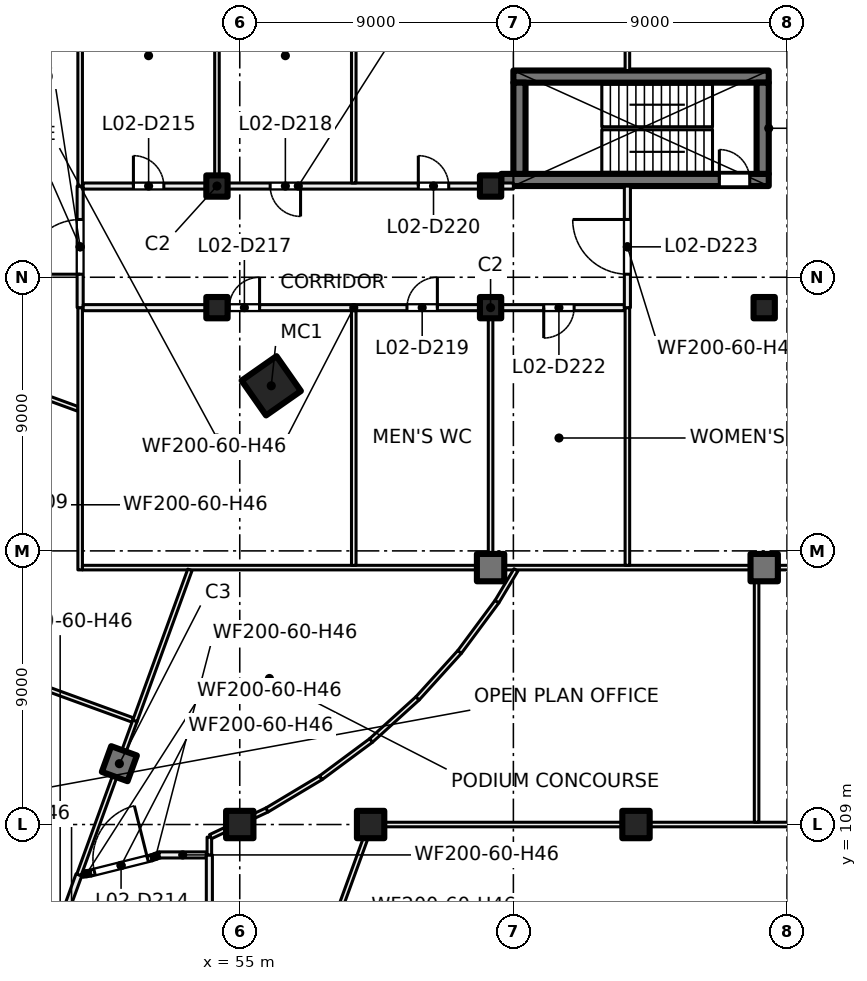
"""IFC4 building model, lengths in metres.
Left out: names, types, materials, properties, quantities, classifications, styles, units other than length and angle.
Written with IfcOpenShell. Run it as: python <this file> out.ifc"""

import sys

from ifc_helpers import new_model, si_unit, direction, frame, frame_2d, origin, origin_2d, place, context, subcontext, project, spatial, rectangle, hollow_rectangle, extrude, element, fill, save


model = new_model("IFC4")
c1 = context("Model", 3, precision=1e-05, world=origin(), true_north=direction((0.0, 1.0)))
c2 = subcontext(c1, "Body", "Model", "MODEL_VIEW")
j1 = project(units=[si_unit("LENGTHUNIT", "METRE"), si_unit("PLANEANGLEUNIT", "RADIAN")], contexts=[c1])
p1 = place(None, origin())
s1 = spatial("IfcSite", under=j1, at=p1, CompositionType="ELEMENT")
p2 = place(p1, origin())
s2 = spatial("IfcBuilding", under=s1, at=p2, CompositionType="ELEMENT")
p3 = place(p2, frame((0.0, 0.0, 12.5)))
s3 = spatial("IfcBuildingStorey", under=s2, at=p3, CompositionType="ELEMENT", Elevation=12.5)
for number, where, z_axis, x_axis in (
    (1, (55.0, 109.0, 0.0), (0.0, 0.0, 1.0), (1.0, 0.0, 0.0)),
    (2, (59.304, 109.0, 0.0), (0.0, 0.0, 1.0), (1.0, 0.0, 0.0)),
    (3, (68.033, 109.0, 0.0), (0.0, 0.0, 1.0), (1.0, 0.0, 0.0)),
):
    element("IfcColumn", number, at=place(p3, frame(where, z_axis=z_axis, x_axis=x_axis)), inside=s3, PredefinedType="COLUMN", context=c2, shape_type="SweptSolid", body=[
        extrude(rectangle(XDim=0.9, YDim=0.9, at=origin_2d()), origin(), (0.0, 0.0, 1.0), 5.0),
    ])
p4 = place(p3, frame((56.036, 123.43, 0.0), z_axis=(0.0, 0.0, 1.0), x_axis=(0.573576436351, -0.819152044289, 0.0)))
e4 = element("IfcColumn", 4, at=p4, inside=s3, PredefinedType="COLUMN", context=c2, shape_type="SweptSolid", body=[
    extrude(hollow_rectangle(XDim=1.4, YDim=1.4, WallThickness=0.04, at=origin_2d()), origin(), (0.0, 0.0, 1.0), 5.0),
])
for number, where, z_axis, x_axis in (
    (5, (54.25, 130.0, 0.0), (0.0, 0.0, 1.0), (1.0, 0.0, 0.0)),
    (6, (63.25, 130.0, 0.0), (0.0, 0.0, 1.0), (1.0, 0.0, 0.0)),
    (7, (54.25, 126.0, 0.0), (0.0, 0.0, 1.0), (1.0, 0.0, 0.0)),
    (8, (63.25, 126.0, 0.0), (0.0, 0.0, 1.0), (1.0, 0.0, 0.0)),
    (9, (72.25, 126.0, 0.0), (0.0, 0.0, 1.0), (1.0, 0.0, 0.0)),
):
    element("IfcColumn", number, at=place(p3, frame(where, z_axis=z_axis, x_axis=x_axis)), inside=s3, PredefinedType="COLUMN", context=c2, shape_type="SweptSolid", body=[
        extrude(rectangle(XDim=0.7, YDim=0.7, at=origin_2d()), origin(), (0.0, 0.0, 1.0), 5.0),
    ])
for number, where, z_axis, x_axis in (
    (10, (63.25, 117.45, 0.0), (0.0, 0.0, 1.0), (1.0, 0.0, 0.0)),
    (11, (72.25, 117.45, 0.0), (0.0, 0.0, 1.0), (1.0, 0.0, 0.0)),
    (12, (51.04, 111.001, 0.0), (0.0, 0.0, 1.0), (-0.342, -0.94, 0.0)),
):
    element("IfcColumn", number, at=place(p3, frame(where, z_axis=z_axis, x_axis=x_axis)), inside=s3, PredefinedType="COLUMN", context=c2, shape_type="SweptSolid", body=[
        extrude(rectangle(XDim=0.9, YDim=0.9, at=origin_2d()), origin(), (0.0, 0.0, 1.0), 5.0),
    ])
p5 = place(p3, frame((63.6, 130.2, 0.0), z_axis=(0.0, 0.0, 1.0), x_axis=(1.0, 0.0, 0.0)))
e13 = element("IfcWall", 13, at=p5, inside=s3, PredefinedType="SHEAR", context=c2, shape_type="SweptSolid", body=[
    extrude(rectangle(XDim=8.8, YDim=0.4, at=frame_2d((4.4, 0.0))), origin(), (0.0, 0.0, 1.0), 5.0),
])
p6 = place(p5, frame((7.175, 0.0, 0.0)))
e14 = element("IfcOpeningElement", 14, at=p6, cuts=e13, PredefinedType="OPENING", context=c2, shape_type="SweptSolid", body=[
    extrude(rectangle(XDim=1.0, YDim=2.1, at=frame_2d((0.5, 1.05))), frame((0.0, 0.21, 0.0), z_axis=(0.0, -1.0, 0.0), x_axis=(1.0, 0.0, 0.0)), (0.0, 0.0, 1.0), 0.42),
])
p7 = place(p3, frame((64.0, 133.6, 0.0), z_axis=(0.0, 0.0, 1.0), x_axis=(1.0, 0.0, 0.0)))
e15 = element("IfcWall", 15, at=p7, inside=s3, PredefinedType="SHEAR", context=c2, shape_type="SweptSolid", body=[
    extrude(rectangle(XDim=8.4, YDim=0.4, at=frame_2d((4.2, 0.0))), origin(), (0.0, 0.0, 1.0), 5.0),
])
for number, where, z_axis, x_axis in (
    (16, (64.2, 130.4, 0.0), (0.0, 0.0, 1.0), (0.0, 1.0, 0.0)),
    (17, (72.2, 130.4, 0.0), (0.0, 0.0, 1.0), (0.0, 1.0, 0.0)),
):
    element("IfcWall", number, at=place(p3, frame(where, z_axis=z_axis, x_axis=x_axis)), inside=s3, PredefinedType="SHEAR", context=c2, shape_type="SweptSolid", body=[
        extrude(rectangle(XDim=3.0, YDim=0.4, at=frame_2d((1.5, 0.0))), origin(), (0.0, 0.0, 1.0), 5.0),
    ])
p8 = place(p3, frame((43.613, 115.301, 0.0), z_axis=(0.0, 0.0, 1.0), x_axis=(0.93970742794, -0.341979458265, 0.0)))
e18 = element("IfcWall", 18, at=p8, inside=s3, PredefinedType="PARTITIONING", context=c2, shape_type="SweptSolid", body=[
    extrude(rectangle(XDim=8.375, YDim=0.15, at=frame_2d((4.188, 0.0))), origin(), (0.0, 0.0, 1.0), 4.6),
])
p9 = place(p3, frame((46.597, 123.792, 0.0), z_axis=(0.0, 0.0, 1.0), x_axis=(0.939619227089, -0.342221723572, 0.0)))
e19 = element("IfcWall", 19, at=p9, inside=s3, PredefinedType="PARTITIONING", context=c2, shape_type="SweptSolid", body=[
    extrude(rectangle(XDim=3.276, YDim=0.15, at=frame_2d((1.638, 0.0))), origin(), (0.0, 0.0, 1.0), 4.6),
])
p10 = place(p3, frame((48.475, 103.953, 0.0), z_axis=(0.0, 0.0, 1.0), x_axis=(0.341992779494, 0.939702579955, 0.0)))
e20 = element("IfcWall", 20, at=p10, inside=s3, PredefinedType="PARTITIONING", context=c2, shape_type="SweptSolid", body=[
    extrude(rectangle(XDim=3.611, YDim=0.2, at=frame_2d((1.805, 0.0))), origin(), (0.0, 0.0, 1.0), 4.6),
])
p11 = place(p3, frame((49.823, 107.363, 0.0), z_axis=(0.0, 0.0, 1.0), x_axis=(0.988866439098, 0.148805798359, 0.0)))
e21 = element("IfcWall", 21, at=p11, inside=s3, PredefinedType="PARTITIONING", context=c2, shape_type="SweptSolid", body=[
    extrude(rectangle(XDim=0.282, YDim=0.2, at=frame_2d((0.141, 0.0))), origin(), (0.0, 0.0, 1.0), 4.6),
])
p12 = place(p3, frame((49.71, 107.346, 0.0), z_axis=(0.0, 0.0, 1.0), x_axis=(0.341943087223, 0.939720663336, 0.0)))
e22 = element("IfcWall", 22, at=p12, inside=s3, PredefinedType="PARTITIONING", context=c2, shape_type="SweptSolid", body=[
    extrude(rectangle(XDim=5.39, YDim=0.15, at=frame_2d((2.695, 0.0))), origin(), (0.0, 0.0, 1.0), 4.6),
])
p13 = place(p3, frame((49.75, 117.375, 0.0), z_axis=(0.0, 0.0, 1.0), x_axis=(0.0, 1.0, 0.0)))
e23 = element("IfcWall", 23, at=p13, inside=s3, PredefinedType="PARTITIONING", context=c2, shape_type="SweptSolid", body=[
    extrude(rectangle(XDim=8.625, YDim=0.15, at=frame_2d((4.312, 0.0))), origin(), (0.0, 0.0, 1.0), 4.6),
])
p14 = place(p3, frame((49.825, 117.45, 0.0), z_axis=(0.0, 0.0, 1.0), x_axis=(1.0, 0.0, 0.0)))
e24 = element("IfcWall", 24, at=p14, inside=s3, PredefinedType="PARTITIONING", context=c2, shape_type="SweptSolid", body=[
    extrude(rectangle(XDim=41.175, YDim=0.15, at=frame_2d((20.587, 0.0))), origin(), (0.0, 0.0, 1.0), 4.6),
])
p15 = place(p3, frame((49.75, 126.0, 0.0), z_axis=(0.0, 0.0, 1.0), x_axis=(0.0, 1.0, 0.0)))
e25 = element("IfcWall", 25, at=p15, inside=s3, PredefinedType="PARTITIONING", context=c2, shape_type="SweptSolid", body=[
    extrude(rectangle(XDim=4.0, YDim=0.2, at=frame_2d((2.0, 0.0))), origin(), (0.0, 0.0, 1.0), 4.6),
])
p16 = place(p15, frame((1.1, 0.0, 0.0)))
e26 = element("IfcOpeningElement", 26, at=p16, cuts=e25, PredefinedType="OPENING", context=c2, shape_type="SweptSolid", body=[
    extrude(rectangle(XDim=1.8, YDim=2.1, at=frame_2d((0.9, 1.05))), frame((0.0, 0.11, 0.0), z_axis=(0.0, -1.0, 0.0), x_axis=(1.0, 0.0, 0.0)), (0.0, 0.0, 1.0), 0.22),
])
p17 = place(p3, frame((67.65, 126.0, 0.0), z_axis=(0.0, 0.0, 1.0), x_axis=(-1.0, 0.0, 0.0)))
e27 = element("IfcWall", 27, at=p17, inside=s3, PredefinedType="PARTITIONING", context=c2, shape_type="SweptSolid", body=[
    extrude(rectangle(XDim=17.8, YDim=0.2, at=frame_2d((8.9, 0.0))), origin(), (0.0, 0.0, 1.0), 4.6),
])
p18 = place(p17, frame((11.998, 0.0, 0.0)))
e28 = element("IfcOpeningElement", 28, at=p18, cuts=e27, PredefinedType="OPENING", context=c2, shape_type="SweptSolid", body=[
    extrude(rectangle(XDim=1.0, YDim=2.1, at=frame_2d((0.5, 1.05))), frame((0.0, 0.11, 0.0), z_axis=(0.0, -1.0, 0.0), x_axis=(1.0, 0.0, 0.0)), (0.0, 0.0, 1.0), 0.22),
])
p19 = place(p17, frame((6.15, 0.0, 0.0)))
e29 = element("IfcOpeningElement", 29, at=p19, cuts=e27, PredefinedType="OPENING", context=c2, shape_type="SweptSolid", body=[
    extrude(rectangle(XDim=1.0, YDim=2.1, at=frame_2d((0.5, 1.05))), frame((0.0, 0.11, 0.0), z_axis=(0.0, -1.0, 0.0), x_axis=(1.0, 0.0, 0.0)), (0.0, 0.0, 1.0), 0.22),
])
p20 = place(p17, frame((1.652, 0.0, 0.0)))
e30 = element("IfcOpeningElement", 30, at=p20, cuts=e27, PredefinedType="OPENING", context=c2, shape_type="SweptSolid", body=[
    extrude(rectangle(XDim=1.0, YDim=2.1, at=frame_2d((0.5, 1.05))), frame((0.0, 0.11, 0.0), z_axis=(0.0, -1.0, 0.0), x_axis=(1.0, 0.0, 0.0)), (0.0, 0.0, 1.0), 0.22),
])
p21 = place(p3, frame((49.75, 130.0, 0.0), z_axis=(0.0, 0.0, 1.0), x_axis=(0.0, 1.0, 0.0)))
e31 = element("IfcWall", 31, at=p21, inside=s3, PredefinedType="PARTITIONING", context=c2, shape_type="SweptSolid", body=[
    extrude(rectangle(XDim=8.625, YDim=0.15, at=frame_2d((4.312, 0.0))), origin(), (0.0, 0.0, 1.0), 4.6),
])
p22 = place(p3, frame((49.85, 130.0, 0.0), z_axis=(0.0, 0.0, 1.0), x_axis=(1.0, 0.0, 0.0)))
e32 = element("IfcWall", 32, at=p22, inside=s3, PredefinedType="PARTITIONING", context=c2, shape_type="SweptSolid", body=[
    extrude(rectangle(XDim=14.15, YDim=0.2, at=frame_2d((7.075, 0.0))), origin(), (0.0, 0.0, 1.0), 4.6),
])
p23 = place(p22, frame((1.652, 0.0, 0.0)))
e33 = element("IfcOpeningElement", 33, at=p23, cuts=e32, PredefinedType="OPENING", context=c2, shape_type="SweptSolid", body=[
    extrude(rectangle(XDim=1.0, YDim=2.1, at=frame_2d((0.5, 1.05))), frame((0.0, 0.11, 0.0), z_axis=(0.0, -1.0, 0.0), x_axis=(1.0, 0.0, 0.0)), (0.0, 0.0, 1.0), 0.22),
])
p24 = place(p22, frame((6.15, 0.0, 0.0)))
e34 = element("IfcOpeningElement", 34, at=p24, cuts=e32, PredefinedType="OPENING", context=c2, shape_type="SweptSolid", body=[
    extrude(rectangle(XDim=1.0, YDim=2.1, at=frame_2d((0.5, 1.05))), frame((0.0, 0.11, 0.0), z_axis=(0.0, -1.0, 0.0), x_axis=(1.0, 0.0, 0.0)), (0.0, 0.0, 1.0), 0.22),
])
p25 = place(p22, frame((11.023, 0.0, 0.0)))
e35 = element("IfcOpeningElement", 35, at=p25, cuts=e32, PredefinedType="OPENING", context=c2, shape_type="SweptSolid", body=[
    extrude(rectangle(XDim=1.0, YDim=2.1, at=frame_2d((0.5, 1.05))), frame((0.0, 0.11, 0.0), z_axis=(0.0, -1.0, 0.0), x_axis=(1.0, 0.0, 0.0)), (0.0, 0.0, 1.0), 0.22),
])
p26 = place(p3, frame((52.101, 107.905, 0.0), z_axis=(0.0, 0.0, 1.0), x_axis=(-0.970177165917, -0.242396919811, 0.0)))
e36 = element("IfcWall", 36, at=p26, inside=s3, PredefinedType="PARTITIONING", context=c2, shape_type="SweptSolid", body=[
    extrude(rectangle(XDim=2.071, YDim=0.2, at=frame_2d((1.035, 0.0))), origin(), (0.0, 0.0, 1.0), 4.6),
])
p27 = place(p26, frame((0.136, 0.0, 0.0)))
e37 = element("IfcOpeningElement", 37, at=p27, cuts=e36, PredefinedType="OPENING", context=c2, shape_type="SweptSolid", body=[
    extrude(rectangle(XDim=1.8, YDim=2.1, at=frame_2d((0.9, 1.05))), frame((0.0, 0.11, 0.0), z_axis=(0.0, -1.0, 0.0), x_axis=(1.0, 0.0, 0.0)), (0.0, 0.0, 1.0), 0.22),
])
p28 = place(p3, frame((51.553, 112.411, 0.0), z_axis=(0.0, 0.0, 1.0), x_axis=(0.342076997639, 0.93967192556, 0.0)))
e38 = element("IfcWall", 38, at=p28, inside=s3, PredefinedType="PARTITIONING", context=c2, shape_type="SweptSolid", body=[
    extrude(rectangle(XDim=5.283, YDim=0.15, at=frame_2d((2.641, 0.0))), origin(), (0.0, 0.0, 1.0), 4.6),
])
p29 = place(p3, frame((52.091, 107.902, 0.0), z_axis=(0.0, 0.0, 1.0), x_axis=(0.940856992367, 0.338803954986, 0.0)))
e39 = element("IfcWall", 39, at=p29, inside=s3, PredefinedType="PARTITIONING", context=c2, shape_type="SweptSolid", body=[
    extrude(rectangle(XDim=0.307, YDim=0.2, at=frame_2d((0.153, 0.0))), origin(), (0.0, 0.0, 1.0), 4.6),
])
p30 = place(p3, frame((52.347, 108.0, 0.0), z_axis=(0.0, 0.0, 1.0), x_axis=(1.0, 0.0, 0.0)))
e40 = element("IfcWall", 40, at=p30, inside=s3, PredefinedType="PARTITIONING", context=c2, shape_type="SweptSolid", body=[
    extrude(rectangle(XDim=1.553, YDim=0.2, at=frame_2d((0.776, 0.0))), origin(), (0.0, 0.0, 1.0), 4.6),
])
p31 = place(p3, frame((54.0, 94.715, 0.0), z_axis=(0.0, 0.0, 1.0), x_axis=(0.0, 1.0, 0.0)))
e41 = element("IfcWall", 41, at=p31, inside=s3, PredefinedType="PARTITIONING", context=c2, shape_type="SweptSolid", body=[
    extrude(rectangle(XDim=13.285, YDim=0.2, at=frame_2d((6.643, 0.0))), origin(), (0.0, 0.0, 1.0), 4.6),
])
p32 = place(p3, frame((54.0, 94.429, 0.0), z_axis=(0.0, 0.0, 1.0), x_axis=(0.342085241875, 0.939668924298, 0.0)))
e42 = element("IfcWall", 42, at=p32, inside=s3, PredefinedType="PARTITIONING", context=c2, shape_type="SweptSolid", body=[
    extrude(rectangle(XDim=15.581, YDim=0.15, at=frame_2d((7.791, 0.0))), origin(), (0.0, 0.0, 1.0), 4.6),
])
p33 = place(p3, frame((54.0, 108.0, 0.0), z_axis=(0.0, 0.0, 1.0), x_axis=(0.0, 1.0, 0.0)))
e43 = element("IfcWall", 43, at=p33, inside=s3, PredefinedType="PARTITIONING", context=c2, shape_type="SweptSolid", body=[
    extrude(rectangle(XDim=0.586, YDim=0.15, at=frame_2d((0.293, 0.0))), origin(), (0.0, 0.0, 1.0), 4.6),
])
p34 = place(p3, frame((54.036, 108.599, 0.0), z_axis=(0.0, 0.0, 1.0), x_axis=(0.903959249768, 0.427618608995, 0.0)))
e44 = element("IfcWall", 44, at=p34, inside=s3, PredefinedType="PARTITIONING", context=c2, shape_type="SweptSolid", body=[
    extrude(rectangle(XDim=2.064, YDim=0.15, at=frame_2d((1.032, 0.0))), origin(), (0.0, 0.0, 1.0), 4.6),
])
p35 = place(p3, frame((54.25, 130.1, 0.0), z_axis=(0.0, 0.0, 1.0), x_axis=(0.0, 1.0, 0.0)))
e45 = element("IfcWall", 45, at=p35, inside=s3, PredefinedType="PARTITIONING", context=c2, shape_type="SweptSolid", body=[
    extrude(rectangle(XDim=8.375, YDim=0.15, at=frame_2d((4.188, 0.0))), origin(), (0.0, 0.0, 1.0), 4.6),
])
p36 = place(p3, frame((55.896, 109.478, 0.0), z_axis=(0.0, 0.0, 1.0), x_axis=(0.857784452141, 0.514009565734, 0.0)))
e46 = element("IfcWall", 46, at=p36, inside=s3, PredefinedType="PARTITIONING", context=c2, shape_type="SweptSolid", body=[
    extrude(rectangle(XDim=2.068, YDim=0.15, at=frame_2d((1.034, 0.0))), origin(), (0.0, 0.0, 1.0), 4.6),
])
p37 = place(p3, frame((57.664, 110.537, 0.0), z_axis=(0.0, 0.0, 1.0), x_axis=(0.80317638599, 0.595741297031, 0.0)))
e47 = element("IfcWall", 47, at=p37, inside=s3, PredefinedType="PARTITIONING", context=c2, shape_type="SweptSolid", body=[
    extrude(rectangle(XDim=2.068, YDim=0.15, at=frame_2d((1.034, 0.0))), origin(), (0.0, 0.0, 1.0), 4.6),
])
for number, where, z_axis, x_axis in (
    (48, (58.75, 117.525, 0.0), (0.0, 0.0, 1.0), (0.0, 1.0, 0.0)),
    (49, (58.75, 130.1, 0.0), (0.0, 0.0, 1.0), (0.0, 1.0, 0.0)),
):
    element("IfcWall", number, at=place(p3, frame(where, z_axis=z_axis, x_axis=x_axis)), inside=s3, PredefinedType="PARTITIONING", context=c2, shape_type="SweptSolid", body=[
        extrude(rectangle(XDim=8.375, YDim=0.15, at=frame_2d((4.188, 0.0))), origin(), (0.0, 0.0, 1.0), 4.6),
    ])
p38 = place(p3, frame((59.384, 109.0, 0.0), z_axis=(0.0, 0.0, 1.0), x_axis=(1.0, 0.0, 0.0)))
e50 = element("IfcWall", 50, at=p38, inside=s3, PredefinedType="PARTITIONING", context=c2, shape_type="SweptSolid", body=[
    extrude(rectangle(XDim=46.116, YDim=0.15, at=frame_2d((23.058, 0.0))), origin(), (0.0, 0.0, 1.0), 4.6),
])
p39 = place(p38, frame((21.116, 0.0, 0.0)))
e51 = element("IfcOpeningElement", 51, at=p39, cuts=e50, PredefinedType="OPENING", context=c2, shape_type="SweptSolid", body=[
    extrude(rectangle(XDim=1.0, YDim=2.1, at=frame_2d((0.5, 1.05))), frame((0.0, 0.085, 0.0), z_axis=(0.0, -1.0, 0.0), x_axis=(1.0, 0.0, 0.0)), (0.0, 0.0, 1.0), 0.17),
])
for number, where, z_axis, x_axis in (
    (52, (59.319, 111.765, 0.0), (0.0, 0.0, 1.0), (0.741, 0.671, 0.0)),
    (53, (60.847, 113.148, 0.0), (0.0, 0.0, 1.0), (0.671, 0.741, 0.0)),
):
    element("IfcWall", number, at=place(p3, frame(where, z_axis=z_axis, x_axis=x_axis)), inside=s3, PredefinedType="PARTITIONING", context=c2, shape_type="SweptSolid", body=[
        extrude(rectangle(XDim=2.068, YDim=0.15, at=frame_2d((1.034, 0.0))), origin(), (0.0, 0.0, 1.0), 4.6),
    ])
p40 = place(p3, frame((62.231, 114.675, 0.0), z_axis=(0.0, 0.0, 1.0), x_axis=(0.595741297031, 0.80317638599, 0.0)))
e54 = element("IfcWall", 54, at=p40, inside=s3, PredefinedType="PARTITIONING", context=c2, shape_type="SweptSolid", body=[
    extrude(rectangle(XDim=2.068, YDim=0.15, at=frame_2d((1.034, 0.0))), origin(), (0.0, 0.0, 1.0), 4.6),
])
p41 = place(p3, frame((63.25, 117.525, 0.0), z_axis=(0.0, 0.0, 1.0), x_axis=(0.0, 1.0, 0.0)))
e55 = element("IfcWall", 55, at=p41, inside=s3, PredefinedType="PARTITIONING", context=c2, shape_type="SweptSolid", body=[
    extrude(rectangle(XDim=8.375, YDim=0.15, at=frame_2d((4.188, 0.0))), origin(), (0.0, 0.0, 1.0), 4.6),
])
p42 = place(p3, frame((63.459, 116.33, 0.0), z_axis=(0.0, 0.0, 1.0), x_axis=(0.513906129706, 0.857846425563, 0.0)))
e56 = element("IfcWall", 56, at=p42, inside=s3, PredefinedType="PARTITIONING", context=c2, shape_type="SweptSolid", body=[
    extrude(rectangle(XDim=1.218, YDim=0.15, at=frame_2d((0.609, 0.0))), origin(), (0.0, 0.0, 1.0), 4.6),
])
p43 = place(p3, frame((67.75, 117.525, 0.0), z_axis=(0.0, 0.0, 1.0), x_axis=(0.0, 1.0, 0.0)))
e57 = element("IfcWall", 57, at=p43, inside=s3, PredefinedType="PARTITIONING", context=c2, shape_type="SweptSolid", body=[
    extrude(rectangle(XDim=8.475, YDim=0.15, at=frame_2d((4.238, 0.0))), origin(), (0.0, 0.0, 1.0), 4.6),
])
p44 = place(p3, frame((67.75, 130.0, 0.0), z_axis=(0.0, 0.0, 1.0), x_axis=(0.0, -1.0, 0.0)))
e58 = element("IfcWall", 58, at=p44, inside=s3, PredefinedType="PARTITIONING", context=c2, shape_type="SweptSolid", body=[
    extrude(rectangle(XDim=4.0, YDim=0.2, at=frame_2d((2.0, 0.0))), origin(), (0.0, 0.0, 1.0), 4.6),
])
p45 = place(p44, frame((1.1, 0.0, 0.0)))
e59 = element("IfcOpeningElement", 59, at=p45, cuts=e58, PredefinedType="OPENING", context=c2, shape_type="SweptSolid", body=[
    extrude(rectangle(XDim=1.8, YDim=2.1, at=frame_2d((0.9, 1.05))), frame((0.0, 0.11, 0.0), z_axis=(0.0, -1.0, 0.0), x_axis=(1.0, 0.0, 0.0)), (0.0, 0.0, 1.0), 0.22),
])
p46 = place(p3, frame((67.75, 133.8, 0.0), z_axis=(0.0, 0.0, 1.0), x_axis=(0.0, 1.0, 0.0)))
e60 = element("IfcWall", 60, at=p46, inside=s3, PredefinedType="PARTITIONING", context=c2, shape_type="SweptSolid", body=[
    extrude(rectangle(XDim=4.675, YDim=0.15, at=frame_2d((2.337, 0.0))), origin(), (0.0, 0.0, 1.0), 4.6),
])
p47 = place(p3, frame((72.0, 109.075, 0.0), z_axis=(0.0, 0.0, 1.0), x_axis=(0.0, 1.0, 0.0)))
e61 = element("IfcWall", 61, at=p47, inside=s3, PredefinedType="PARTITIONING", context=c2, shape_type="SweptSolid", body=[
    extrude(rectangle(XDim=8.3, YDim=0.15, at=frame_2d((4.15, 0.0))), origin(), (0.0, 0.0, 1.0), 4.6),
])
p48 = place(p6, origin())
e62 = element("IfcDoor", 62, at=p48, inside=s3, OperationType="SINGLE_SWING_LEFT", PredefinedType="DOOR", context=c2, shape_type="SweptSolid", body=[
    extrude(rectangle(XDim=1.0, YDim=2.1, at=frame_2d((0.5, 1.05))), frame((0.0, 0.025, 0.0), z_axis=(0.0, -1.0, 0.0), x_axis=(1.0, 0.0, 0.0)), (0.0, 0.0, 1.0), 0.05),
])
fill(e14, e62)
p49 = place(p16, origin())
e63 = element("IfcDoor", 63, at=p49, inside=s3, OperationType="DOUBLE_DOOR_SINGLE_SWING", PredefinedType="DOOR", context=c2, shape_type="SweptSolid", body=[
    extrude(rectangle(XDim=1.8, YDim=2.1, at=frame_2d((0.9, 1.05))), frame((0.0, 0.025, 0.0), z_axis=(0.0, -1.0, 0.0), x_axis=(1.0, 0.0, 0.0)), (0.0, 0.0, 1.0), 0.05),
])
fill(e26, e63)
p50 = place(p27, origin())
e64 = element("IfcDoor", 64, at=p50, inside=s3, OperationType="DOUBLE_DOOR_SINGLE_SWING", PredefinedType="DOOR", context=c2, shape_type="SweptSolid", body=[
    extrude(rectangle(XDim=1.8, YDim=2.1, at=frame_2d((0.9, 1.05))), frame((0.0, 0.025, 0.0), z_axis=(0.0, -1.0, 0.0), x_axis=(1.0, 0.0, 0.0)), (0.0, 0.0, 1.0), 0.05),
])
fill(e37, e64)
p51 = place(p23, origin())
e65 = element("IfcDoor", 65, at=p51, inside=s3, OperationType="SINGLE_SWING_LEFT", PredefinedType="DOOR", context=c2, shape_type="SweptSolid", body=[
    extrude(rectangle(XDim=1.0, YDim=2.1, at=frame_2d((0.5, 1.05))), frame((0.0, 0.025, 0.0), z_axis=(0.0, -1.0, 0.0), x_axis=(1.0, 0.0, 0.0)), (0.0, 0.0, 1.0), 0.05),
])
fill(e33, e65)
p52 = place(p18, origin())
e66 = element("IfcDoor", 66, at=p52, inside=s3, OperationType="SINGLE_SWING_LEFT", PredefinedType="DOOR", context=c2, shape_type="SweptSolid", body=[
    extrude(rectangle(XDim=1.0, YDim=2.1, at=frame_2d((0.5, 1.05))), frame((0.0, 0.025, 0.0), z_axis=(0.0, -1.0, 0.0), x_axis=(1.0, 0.0, 0.0)), (0.0, 0.0, 1.0), 0.05),
])
fill(e28, e66)
p53 = place(p24, origin())
e67 = element("IfcDoor", 67, at=p53, inside=s3, OperationType="SINGLE_SWING_RIGHT", PredefinedType="DOOR", context=c2, shape_type="SweptSolid", body=[
    extrude(rectangle(XDim=1.0, YDim=2.1, at=frame_2d((0.5, 1.05))), frame((0.0, 0.025, 0.0), z_axis=(0.0, -1.0, 0.0), x_axis=(1.0, 0.0, 0.0)), (0.0, 0.0, 1.0), 0.05),
])
fill(e34, e67)
p54 = place(p19, origin())
e68 = element("IfcDoor", 68, at=p54, inside=s3, OperationType="SINGLE_SWING_LEFT", PredefinedType="DOOR", context=c2, shape_type="SweptSolid", body=[
    extrude(rectangle(XDim=1.0, YDim=2.1, at=frame_2d((0.5, 1.05))), frame((0.0, 0.025, 0.0), z_axis=(0.0, -1.0, 0.0), x_axis=(1.0, 0.0, 0.0)), (0.0, 0.0, 1.0), 0.05),
])
fill(e29, e68)
p55 = place(p25, origin())
e69 = element("IfcDoor", 69, at=p55, inside=s3, OperationType="SINGLE_SWING_LEFT", PredefinedType="DOOR", context=c2, shape_type="SweptSolid", body=[
    extrude(rectangle(XDim=1.0, YDim=2.1, at=frame_2d((0.5, 1.05))), frame((0.0, 0.025, 0.0), z_axis=(0.0, -1.0, 0.0), x_axis=(1.0, 0.0, 0.0)), (0.0, 0.0, 1.0), 0.05),
])
fill(e35, e69)
p56 = place(p20, origin())
e70 = element("IfcDoor", 70, at=p56, inside=s3, OperationType="SINGLE_SWING_RIGHT", PredefinedType="DOOR", context=c2, shape_type="SweptSolid", body=[
    extrude(rectangle(XDim=1.0, YDim=2.1, at=frame_2d((0.5, 1.05))), frame((0.0, 0.025, 0.0), z_axis=(0.0, -1.0, 0.0), x_axis=(1.0, 0.0, 0.0)), (0.0, 0.0, 1.0), 0.05),
])
fill(e30, e70)
p57 = place(p45, origin())
e71 = element("IfcDoor", 71, at=p57, inside=s3, OperationType="DOUBLE_DOOR_SINGLE_SWING", PredefinedType="DOOR", context=c2, shape_type="SweptSolid", body=[
    extrude(rectangle(XDim=1.8, YDim=2.1, at=frame_2d((0.9, 1.05))), frame((0.0, 0.025, 0.0), z_axis=(0.0, -1.0, 0.0), x_axis=(1.0, 0.0, 0.0)), (0.0, 0.0, 1.0), 0.05),
])
fill(e59, e71)
save(model, sys.argv[1])
